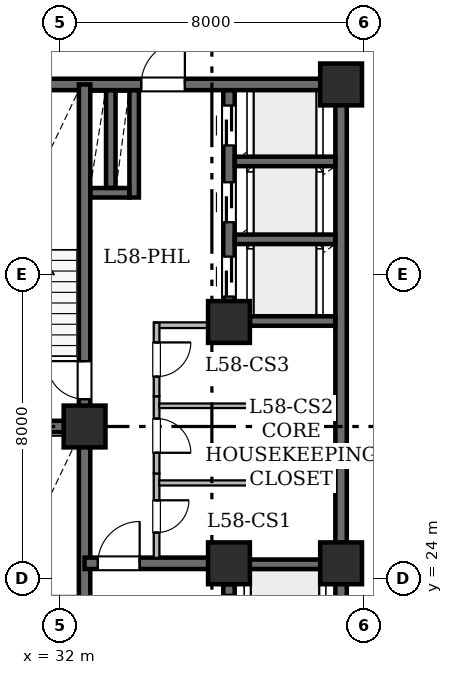
"""IFC4 building model, lengths in metres.
Left out: names, types, materials, properties, quantities, classifications, styles, units other than length and angle.
Written with IfcOpenShell. Run it as: python <this file> out.ifc"""

import sys

from ifc_helpers import new_model, si_unit, direction, frame, frame_2d, origin, origin_2d, place, context, subcontext, project, spatial, rectangle, hollow_rectangle, extrude, element, fill, save


model = new_model("IFC4")
c1 = context("Model", 3, precision=1e-05, world=origin(), true_north=direction((0.0, 1.0)))
c2 = subcontext(c1, "Body", "Model", "MODEL_VIEW")
j1 = project(units=[si_unit("LENGTHUNIT", "METRE"), si_unit("PLANEANGLEUNIT", "RADIAN")], contexts=[c1])
p1 = place(None, origin())
s1 = spatial("IfcSite", under=j1, at=p1, CompositionType="ELEMENT")
p2 = place(p1, origin())
s2 = spatial("IfcBuilding", under=s1, at=p2, CompositionType="ELEMENT")
p3 = place(p2, frame((0.0, 0.0, 228.15)))
s3 = spatial("IfcBuildingStorey", under=s2, at=p3, CompositionType="ELEMENT", Elevation=228.15)
for number, where, z_axis, x_axis in (
    (1, (32.65, 28.0, 0.0), (0.0, 0.0, 1.0), (1.0, 0.0, 0.0)),
    (2, (36.45, 24.4, 0.0), (0.0, 0.0, 1.0), (1.0, 0.0, 0.0)),
    (3, (39.4, 24.4, 0.0), (0.0, 0.0, 1.0), (1.0, 0.0, 0.0)),
    (4, (36.45, 30.75, 0.0), (0.0, 0.0, 1.0), (1.0, 0.0, 0.0)),
    (5, (39.4, 37.0, 0.0), (0.0, 0.0, 1.0), (1.0, 0.0, 0.0)),
):
    element("IfcColumn", number, at=place(p3, frame(where, z_axis=z_axis, x_axis=x_axis)), inside=s3, PredefinedType="COLUMN", context=c2, shape_type="SweptSolid", body=[
        extrude(hollow_rectangle(XDim=1.1, YDim=1.1, WallThickness=0.055, at=origin_2d()), origin(), (0.0, 0.0, 1.0), 3.625),
    ])
p4 = place(p3, frame((29.0, 37.0, 0.0), z_axis=(0.0, 0.0, 1.0), x_axis=(1.0, 0.0, 0.0)))
e6 = element("IfcWall", 6, at=p4, inside=s3, PredefinedType="SHEAR", context=c2, shape_type="SweptSolid", body=[
    extrude(rectangle(XDim=10.4, YDim=0.3, at=frame_2d((5.2, 0.0))), origin(), (0.0, 0.0, 1.0), 3.43),
])
p5 = place(p4, frame((5.14, 0.0, 0.0)))
e7 = element("IfcOpeningElement", 7, at=p5, cuts=e6, PredefinedType="OPENING", context=c2, shape_type="SweptSolid", body=[
    extrude(rectangle(XDim=1.15, YDim=2.2, at=frame_2d((0.575, 1.1))), frame((0.0, 0.16, 0.0), z_axis=(0.0, -1.0, 0.0), x_axis=(1.0, 0.0, 0.0)), (0.0, 0.0, 1.0), 0.32),
])
p6 = place(p3, frame((39.4, 19.0, 0.0), z_axis=(0.0, 0.0, 1.0), x_axis=(0.0, 1.0, 0.0)))
e8 = element("IfcWall", 8, at=p6, inside=s3, PredefinedType="SHEAR", context=c2, shape_type="SweptSolid", body=[
    extrude(rectangle(XDim=5.4, YDim=0.3, at=frame_2d((2.7, 0.0))), origin(), (0.0, 0.0, 1.0), 3.43),
])
p7 = place(p3, frame((39.4, 24.4, 0.0), z_axis=(0.0, 0.0, 1.0), x_axis=(0.0, 1.0, 0.0)))
e9 = element("IfcWall", 9, at=p7, inside=s3, PredefinedType="SHEAR", context=c2, shape_type="SweptSolid", body=[
    extrude(rectangle(XDim=12.6, YDim=0.3, at=frame_2d((6.3, 0.0))), origin(), (0.0, 0.0, 1.0), 3.43),
])
p8 = place(p3, frame((32.65, 19.0, 0.0), z_axis=(0.0, 0.0, 1.0), x_axis=(0.0, 1.0, 0.0)))
e10 = element("IfcWall", 10, at=p8, inside=s3, PredefinedType="SHEAR", context=c2, shape_type="SweptSolid", body=[
    extrude(rectangle(XDim=9.0, YDim=0.3, at=frame_2d((4.5, 0.0))), origin(), (0.0, 0.0, 1.0), 3.43),
])
p9 = place(p8, frame((0.72, 0.0, 0.0)))
e11 = element("IfcOpeningElement", 11, at=p9, cuts=e10, PredefinedType="OPENING", context=c2, shape_type="SweptSolid", body=[
    extrude(rectangle(XDim=1.0, YDim=2.15, at=frame_2d((0.5, 1.075))), frame((0.0, 0.16, 0.0), z_axis=(0.0, -1.0, 0.0), x_axis=(1.0, 0.0, 0.0)), (0.0, 0.0, 1.0), 0.32),
])
p10 = place(p3, frame((32.65, 28.0, 0.0), z_axis=(0.0, 0.0, 1.0), x_axis=(0.0, 1.0, 0.0)))
e12 = element("IfcWall", 12, at=p10, inside=s3, PredefinedType="SHEAR", context=c2, shape_type="SweptSolid", body=[
    extrude(rectangle(XDim=9.0, YDim=0.3, at=frame_2d((4.5, 0.0))), origin(), (0.0, 0.0, 1.0), 3.43),
])
p11 = place(p10, frame((0.72, 0.0, 0.0)))
e13 = element("IfcOpeningElement", 13, at=p11, cuts=e12, PredefinedType="OPENING", context=c2, shape_type="SweptSolid", body=[
    extrude(rectangle(XDim=1.0, YDim=2.15, at=frame_2d((0.5, 1.075))), frame((0.0, 0.16, 0.0), z_axis=(0.0, -1.0, 0.0), x_axis=(1.0, 0.0, 0.0)), (0.0, 0.0, 1.0), 0.32),
])
p12 = place(p3, frame((29.0, 28.0, 0.0), z_axis=(0.0, 0.0, 1.0), x_axis=(1.0, 0.0, 0.0)))
e14 = element("IfcWall", 14, at=p12, inside=s3, PredefinedType="SHEAR", context=c2, shape_type="SweptSolid", body=[
    extrude(rectangle(XDim=3.65, YDim=0.3, at=frame_2d((1.825, 0.0))), origin(), (0.0, 0.0, 1.0), 3.43),
])
p13 = place(p3, frame((32.65, 24.4, 0.0), z_axis=(0.0, 0.0, 1.0), x_axis=(1.0, 0.0, 0.0)))
e15 = element("IfcWall", 15, at=p13, inside=s3, PredefinedType="SHEAR", context=c2, shape_type="SweptSolid", body=[
    extrude(rectangle(XDim=3.8, YDim=0.3, at=frame_2d((1.9, 0.0))), origin(), (0.0, 0.0, 1.0), 3.43),
])
p14 = place(p13, frame((0.35, 0.0, 0.0)))
e16 = element("IfcOpeningElement", 16, at=p14, cuts=e15, PredefinedType="OPENING", context=c2, shape_type="SweptSolid", body=[
    extrude(rectangle(XDim=1.1, YDim=2.15, at=frame_2d((0.55, 1.075))), frame((0.0, 0.16, 0.0), z_axis=(0.0, -1.0, 0.0), x_axis=(1.0, 0.0, 0.0)), (0.0, 0.0, 1.0), 0.32),
])
p15 = place(p3, frame((36.45, 19.154, 0.0), z_axis=(0.0, 0.0, 1.0), x_axis=(0.0, 1.0, 0.0)))
e17 = element("IfcWall", 17, at=p15, inside=s3, PredefinedType="SHEAR", context=c2, shape_type="SweptSolid", body=[
    extrude(rectangle(XDim=4.696, YDim=0.3, at=frame_2d((2.348, 0.0))), origin(), (0.0, 0.0, 1.0), 3.43),
])
p16 = place(p15, frame((0.696, 0.0, 0.0)))
e18 = element("IfcOpeningElement", 18, at=p16, cuts=e17, PredefinedType="OPENING", context=c2, shape_type="SweptSolid", body=[
    extrude(rectangle(XDim=1.1, YDim=2.15, at=frame_2d((0.55, 1.075))), frame((0.0, 0.16, 0.0), z_axis=(0.0, -1.0, 0.0), x_axis=(1.0, 0.0, 0.0)), (0.0, 0.0, 1.0), 0.32),
])
p17 = place(p15, frame((3.316, 0.0, 0.0)))
e19 = element("IfcOpeningElement", 19, at=p17, cuts=e17, PredefinedType="OPENING", context=c2, shape_type="SweptSolid", body=[
    extrude(rectangle(XDim=1.1, YDim=2.15, at=frame_2d((0.55, 1.075))), frame((0.0, 0.16, 0.0), z_axis=(0.0, -1.0, 0.0), x_axis=(1.0, 0.0, 0.0)), (0.0, 0.0, 1.0), 0.32),
])
p18 = place(p3, frame((36.45, 31.3, 0.0), z_axis=(0.0, 0.0, 1.0), x_axis=(0.0, 1.0, 0.0)))
e20 = element("IfcWall", 20, at=p18, inside=s3, PredefinedType="SHEAR", context=c2, shape_type="SweptSolid", body=[
    extrude(rectangle(XDim=5.546, YDim=0.3, at=frame_2d((2.773, 0.0))), origin(), (0.0, 0.0, 1.0), 3.43),
])
p19 = place(p18, frame((0.12, 0.0, 0.0)))
e21 = element("IfcOpeningElement", 21, at=p19, cuts=e20, PredefinedType="OPENING", context=c2, shape_type="SweptSolid", body=[
    extrude(rectangle(XDim=1.05, YDim=2.15, at=frame_2d((0.525, 1.075))), frame((0.0, 0.16, 0.0), z_axis=(0.0, -1.0, 0.0), x_axis=(1.0, 0.0, 0.0)), (0.0, 0.0, 1.0), 0.32),
])
p20 = place(p18, frame((2.075, 0.0, 0.0)))
e22 = element("IfcOpeningElement", 22, at=p20, cuts=e20, PredefinedType="OPENING", context=c2, shape_type="SweptSolid", body=[
    extrude(rectangle(XDim=1.05, YDim=2.15, at=frame_2d((0.525, 1.075))), frame((0.0, 0.16, 0.0), z_axis=(0.0, -1.0, 0.0), x_axis=(1.0, 0.0, 0.0)), (0.0, 0.0, 1.0), 0.32),
])
p21 = place(p18, frame((4.095, 0.0, 0.0)))
e23 = element("IfcOpeningElement", 23, at=p21, cuts=e20, PredefinedType="OPENING", context=c2, shape_type="SweptSolid", body=[
    extrude(rectangle(XDim=1.05, YDim=2.15, at=frame_2d((0.525, 1.075))), frame((0.0, 0.16, 0.0), z_axis=(0.0, -1.0, 0.0), x_axis=(1.0, 0.0, 0.0)), (0.0, 0.0, 1.0), 0.32),
])
p22 = place(p3, frame((36.604, 24.375, 0.0), z_axis=(0.0, 0.0, 1.0), x_axis=(1.0, 0.0, 0.0)))
e24 = element("IfcWall", 24, at=p22, inside=s3, PredefinedType="SHEAR", context=c2, shape_type="SweptSolid", body=[
    extrude(rectangle(XDim=2.642, YDim=0.25, at=frame_2d((1.321, 0.0))), origin(), (0.0, 0.0, 1.0), 3.43),
])
p23 = place(p3, frame((37.004, 30.775, 0.0), z_axis=(0.0, 0.0, 1.0), x_axis=(1.0, 0.0, 0.0)))
e25 = element("IfcWall", 25, at=p23, inside=s3, PredefinedType="SHEAR", context=c2, shape_type="SweptSolid", body=[
    extrude(rectangle(XDim=2.242, YDim=0.25, at=frame_2d((1.121, 0.0))), origin(), (0.0, 0.0, 1.0), 3.43),
])
for number, where, z_axis, x_axis in (
    (26, (36.604, 32.925, 0.0), (0.0, 0.0, 1.0), (1.0, 0.0, 0.0)),
    (27, (36.604, 34.975, 0.0), (0.0, 0.0, 1.0), (1.0, 0.0, 0.0)),
):
    element("IfcWall", number, at=place(p3, frame(where, z_axis=z_axis, x_axis=x_axis)), inside=s3, PredefinedType="SHEAR", context=c2, shape_type="SweptSolid", body=[
        extrude(rectangle(XDim=2.642, YDim=0.25, at=frame_2d((1.321, 0.0))), origin(), (0.0, 0.0, 1.0), 3.43),
    ])
p24 = place(p3, frame((33.955, 34.025, 0.0), z_axis=(0.0, 0.0, 1.0), x_axis=(0.0, 1.0, 0.0)))
e28 = element("IfcWall", 28, at=p24, inside=s3, PredefinedType="SHEAR", context=c2, shape_type="SweptSolid", body=[
    extrude(rectangle(XDim=2.821, YDim=0.25, at=frame_2d((1.411, 0.0))), origin(), (0.0, 0.0, 1.0), 3.43),
])
p25 = place(p3, frame((32.804, 34.15, 0.0), z_axis=(0.0, 0.0, 1.0), x_axis=(1.0, 0.0, 0.0)))
e29 = element("IfcWall", 29, at=p25, inside=s3, PredefinedType="SHEAR", context=c2, shape_type="SweptSolid", body=[
    extrude(rectangle(XDim=1.022, YDim=0.25, at=frame_2d((0.511, 0.0))), origin(), (0.0, 0.0, 1.0), 3.43),
])
p26 = place(p3, frame((33.34, 34.279, 0.0), z_axis=(0.0, 0.0, 1.0), x_axis=(0.0, 1.0, 0.0)))
e30 = element("IfcWall", 30, at=p26, inside=s3, PredefinedType="SHEAR", context=c2, shape_type="SweptSolid", body=[
    extrude(rectangle(XDim=2.567, YDim=0.25, at=frame_2d((1.283, 0.0))), origin(), (0.0, 0.0, 1.0), 3.43),
])
p27 = place(p3, frame((34.545, 26.764, 0.0), z_axis=(0.0, 0.0, 1.0), x_axis=(0.0, -1.0, 0.0)))
e31 = element("IfcWall", 31, at=p27, inside=s3, PredefinedType="STANDARD", context=c2, shape_type="SweptSolid", body=[
    extrude(rectangle(XDim=2.22, YDim=0.15, at=frame_2d((1.11, 0.0))), origin(), (0.0, 0.0, 1.0), 3.43),
])
p28 = place(p27, frame((0.706, 0.0, 0.0)))
e32 = element("IfcOpeningElement", 32, at=p28, cuts=e31, PredefinedType="OPENING", context=c2, shape_type="SweptSolid", body=[
    extrude(rectangle(XDim=0.85, YDim=2.1, at=frame_2d((0.425, 1.05))), frame((0.0, 0.085, 0.0), z_axis=(0.0, -1.0, 0.0), x_axis=(1.0, 0.0, 0.0)), (0.0, 0.0, 1.0), 0.17),
])
p29 = place(p3, frame((34.545, 28.794, 0.0), z_axis=(0.0, 0.0, 1.0), x_axis=(0.0, -1.0, 0.0)))
e33 = element("IfcWall", 33, at=p29, inside=s3, PredefinedType="STANDARD", context=c2, shape_type="SweptSolid", body=[
    extrude(rectangle(XDim=2.03, YDim=0.15, at=frame_2d((1.015, 0.0))), origin(), (0.0, 0.0, 1.0), 3.43),
])
p30 = place(p29, frame((0.586, 0.0, 0.0)))
e34 = element("IfcOpeningElement", 34, at=p30, cuts=e33, PredefinedType="OPENING", context=c2, shape_type="SweptSolid", body=[
    extrude(rectangle(XDim=0.9, YDim=2.1, at=frame_2d((0.45, 1.05))), frame((0.0, 0.085, 0.0), z_axis=(0.0, -1.0, 0.0), x_axis=(1.0, 0.0, 0.0)), (0.0, 0.0, 1.0), 0.17),
])
p31 = place(p3, frame((36.3, 30.665, 0.0), z_axis=(0.0, 0.0, 1.0), x_axis=(-1.0, 0.0, 0.0)))
e35 = element("IfcWall", 35, at=p31, inside=s3, PredefinedType="STANDARD", context=c2, shape_type="SweptSolid", body=[
    extrude(rectangle(XDim=1.82, YDim=0.15, at=frame_2d((0.91, 0.0))), origin(), (0.0, 0.0, 1.0), 3.43),
])
p32 = place(p3, frame((34.545, 30.73, 0.0), z_axis=(0.0, 0.0, 1.0), x_axis=(0.0, -1.0, 0.0)))
e36 = element("IfcWall", 36, at=p32, inside=s3, PredefinedType="STANDARD", context=c2, shape_type="SweptSolid", body=[
    extrude(rectangle(XDim=1.936, YDim=0.15, at=frame_2d((0.968, 0.0))), origin(), (0.0, 0.0, 1.0), 3.43),
])
p33 = place(p32, frame((0.518, 0.0, 0.0)))
e37 = element("IfcOpeningElement", 37, at=p33, cuts=e36, PredefinedType="OPENING", context=c2, shape_type="SweptSolid", body=[
    extrude(rectangle(XDim=0.9, YDim=2.1, at=frame_2d((0.45, 1.05))), frame((0.0, 0.085, 0.0), z_axis=(0.0, -1.0, 0.0), x_axis=(1.0, 0.0, 0.0)), (0.0, 0.0, 1.0), 0.17),
])
p34 = place(p3, frame((34.612, 26.515, 0.0), z_axis=(0.0, 0.0, 1.0), x_axis=(1.0, 0.0, 0.0)))
e38 = element("IfcWall", 38, at=p34, inside=s3, PredefinedType="PARTITIONING", context=c2, shape_type="SweptSolid", body=[
    extrude(rectangle(XDim=4.644, YDim=0.135, at=frame_2d((2.322, 0.0))), origin(), (0.0, 0.0, 1.0), 3.43),
])
p35 = place(p3, frame((34.612, 28.545, 0.0), z_axis=(0.0, 0.0, 1.0), x_axis=(1.0, 0.0, 0.0)))
e39 = element("IfcWall", 39, at=p35, inside=s3, PredefinedType="PARTITIONING", context=c2, shape_type="SweptSolid", body=[
    extrude(rectangle(XDim=4.644, YDim=0.12, at=frame_2d((2.322, 0.0))), origin(), (0.0, 0.0, 1.0), 3.43),
])
p36 = place(p11, origin())
e40 = element("IfcDoor", 40, at=p36, inside=s3, OperationType="SINGLE_SWING_RIGHT", PredefinedType="DOOR", context=c2, shape_type="SweptSolid", body=[
    extrude(rectangle(XDim=1.0, YDim=2.15, at=frame_2d((0.5, 1.075))), frame((0.0, 0.025, 0.0), z_axis=(0.0, -1.0, 0.0), x_axis=(1.0, 0.0, 0.0)), (0.0, 0.0, 1.0), 0.05),
])
fill(e13, e40)
p37 = place(p14, origin())
e41 = element("IfcDoor", 41, at=p37, inside=s3, OperationType="SINGLE_SWING_RIGHT", PredefinedType="DOOR", context=c2, shape_type="SweptSolid", body=[
    extrude(rectangle(XDim=1.1, YDim=2.15, at=frame_2d((0.55, 1.075))), frame((0.0, 0.025, 0.0), z_axis=(0.0, -1.0, 0.0), x_axis=(1.0, 0.0, 0.0)), (0.0, 0.0, 1.0), 0.05),
])
fill(e16, e41)
p38 = place(p5, origin())
e42 = element("IfcDoor", 42, at=p38, inside=s3, OperationType="SINGLE_SWING_RIGHT", PredefinedType="DOOR", context=c2, shape_type="SweptSolid", body=[
    extrude(rectangle(XDim=1.15, YDim=2.2, at=frame_2d((0.575, 1.1))), frame((0.0, 0.025, 0.0), z_axis=(0.0, -1.0, 0.0), x_axis=(1.0, 0.0, 0.0)), (0.0, 0.0, 1.0), 0.05),
])
fill(e7, e42)
p39 = place(p17, origin())
e43 = element("IfcDoor", 43, at=p39, inside=s3, OperationType="SLIDING_TO_LEFT", PredefinedType="DOOR", context=c2, shape_type="SweptSolid", body=[
    extrude(rectangle(XDim=1.1, YDim=2.15, at=frame_2d((0.55, 1.075))), frame((0.0, 0.025, 0.0), z_axis=(0.0, -1.0, 0.0), x_axis=(1.0, 0.0, 0.0)), (0.0, 0.0, 1.0), 0.05),
])
fill(e19, e43)
p40 = place(p19, origin())
e44 = element("IfcDoor", 44, at=p40, inside=s3, OperationType="SLIDING_TO_LEFT", PredefinedType="DOOR", context=c2, shape_type="SweptSolid", body=[
    extrude(rectangle(XDim=1.05, YDim=2.15, at=frame_2d((0.525, 1.075))), frame((0.0, 0.025, 0.0), z_axis=(0.0, -1.0, 0.0), x_axis=(1.0, 0.0, 0.0)), (0.0, 0.0, 1.0), 0.05),
])
fill(e21, e44)
p41 = place(p20, origin())
e45 = element("IfcDoor", 45, at=p41, inside=s3, OperationType="SLIDING_TO_LEFT", PredefinedType="DOOR", context=c2, shape_type="SweptSolid", body=[
    extrude(rectangle(XDim=1.05, YDim=2.15, at=frame_2d((0.525, 1.075))), frame((0.0, 0.025, 0.0), z_axis=(0.0, -1.0, 0.0), x_axis=(1.0, 0.0, 0.0)), (0.0, 0.0, 1.0), 0.05),
])
fill(e22, e45)
p42 = place(p21, origin())
e46 = element("IfcDoor", 46, at=p42, inside=s3, OperationType="SLIDING_TO_LEFT", PredefinedType="DOOR", context=c2, shape_type="SweptSolid", body=[
    extrude(rectangle(XDim=1.05, YDim=2.15, at=frame_2d((0.525, 1.075))), frame((0.0, 0.025, 0.0), z_axis=(0.0, -1.0, 0.0), x_axis=(1.0, 0.0, 0.0)), (0.0, 0.0, 1.0), 0.05),
])
fill(e23, e46)
p43 = place(p28, origin())
e47 = element("IfcDoor", 47, at=p43, inside=s3, OperationType="SINGLE_SWING_LEFT", PredefinedType="DOOR", context=c2, shape_type="SweptSolid", body=[
    extrude(rectangle(XDim=0.85, YDim=2.1, at=frame_2d((0.425, 1.05))), frame((0.0, 0.025, 0.0), z_axis=(0.0, -1.0, 0.0), x_axis=(1.0, 0.0, 0.0)), (0.0, 0.0, 1.0), 0.05),
])
fill(e32, e47)
p44 = place(p30, origin())
e48 = element("IfcDoor", 48, at=p44, inside=s3, OperationType="SINGLE_SWING_RIGHT", PredefinedType="DOOR", context=c2, shape_type="SweptSolid", body=[
    extrude(rectangle(XDim=0.9, YDim=2.1, at=frame_2d((0.45, 1.05))), frame((0.0, 0.025, 0.0), z_axis=(0.0, -1.0, 0.0), x_axis=(1.0, 0.0, 0.0)), (0.0, 0.0, 1.0), 0.05),
])
fill(e34, e48)
p45 = place(p33, origin())
e49 = element("IfcDoor", 49, at=p45, inside=s3, OperationType="SINGLE_SWING_LEFT", PredefinedType="DOOR", context=c2, shape_type="SweptSolid", body=[
    extrude(rectangle(XDim=0.9, YDim=2.1, at=frame_2d((0.45, 1.05))), frame((0.0, 0.025, 0.0), z_axis=(0.0, -1.0, 0.0), x_axis=(1.0, 0.0, 0.0)), (0.0, 0.0, 1.0), 0.05),
])
fill(e37, e49)
save(model, sys.argv[1])
